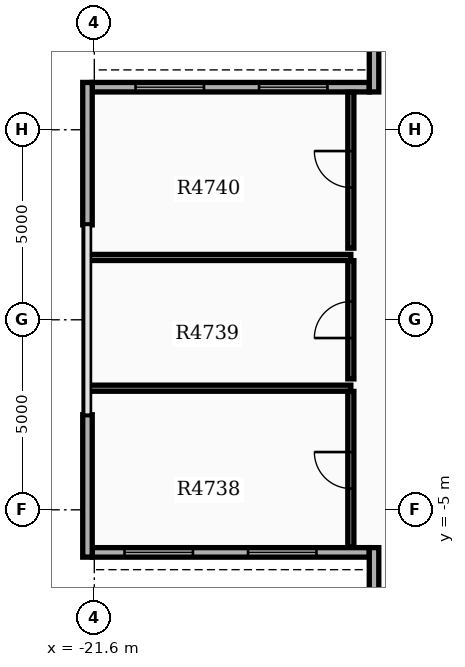
"""IFC4 building model, lengths in metres.
Left out: names, types, materials, properties, quantities, classifications, styles, units other than length and angle.
Written with IfcOpenShell. Run it as: python <this file> out.ifc"""

import sys

from ifc_helpers import new_model, si_unit, direction, frame, frame_2d, origin, place, context, subcontext, project, spatial, rectangle, extrude, element, fill, save


model = new_model("IFC4")
c1 = context("Model", 3, precision=1e-05, world=origin(), true_north=direction((0.0, 1.0)))
c2 = subcontext(c1, "Body", "Model", "MODEL_VIEW")
j1 = project(units=[si_unit("LENGTHUNIT", "METRE"), si_unit("PLANEANGLEUNIT", "RADIAN")], contexts=[c1])
p1 = place(None, origin())
s1 = spatial("IfcSite", under=j1, at=p1, CompositionType="ELEMENT")
p2 = place(p1, origin())
s2 = spatial("IfcBuilding", under=s1, at=p2, CompositionType="ELEMENT")
p3 = place(p2, frame((0.0, 0.0, 308.4)))
s3 = spatial("IfcBuildingStorey", under=s2, at=p3, CompositionType="ELEMENT", Elevation=308.4)
p4 = place(p3, frame((-14.365, 6.12, 0.0), z_axis=(0.0, 0.0, 1.0), x_axis=(-1.0, 0.0, 0.0)))
e1 = element("IfcWall", 1, at=p4, inside=s3, PredefinedType="STANDARD", context=c2, shape_type="SweptSolid", body=[
    extrude(rectangle(XDim=7.29, YDim=0.25, at=frame_2d((3.645, 0.0))), origin(), (0.0, 0.0, 1.0), 3.73),
])
p5 = place(p4, frame((1.1, 0.0, 0.8)))
e2 = element("IfcOpeningElement", 2, at=p5, cuts=e1, PredefinedType="OPENING", context=c2, shape_type="SweptSolid", body=[
    extrude(rectangle(XDim=1.8, YDim=1.8, at=frame_2d((0.9, 0.9))), frame((0.0, 0.135, 0.0), z_axis=(0.0, -1.0, 0.0), x_axis=(1.0, 0.0, 0.0)), (0.0, 0.0, 1.0), 0.27),
])
p6 = place(p4, frame((4.35, 0.0, 0.8)))
e3 = element("IfcOpeningElement", 3, at=p6, cuts=e1, PredefinedType="OPENING", context=c2, shape_type="SweptSolid", body=[
    extrude(rectangle(XDim=1.8, YDim=1.8, at=frame_2d((0.9, 0.9))), frame((0.0, 0.135, 0.0), z_axis=(0.0, -1.0, 0.0), x_axis=(1.0, 0.0, 0.0)), (0.0, 0.0, 1.0), 0.27),
])
p7 = place(p3, frame((-21.655, -6.12, 0.0), z_axis=(0.0, 0.0, 1.0), x_axis=(1.0, 0.0, 0.0)))
e4 = element("IfcWall", 4, at=p7, inside=s3, PredefinedType="STANDARD", context=c2, shape_type="SweptSolid", body=[
    extrude(rectangle(XDim=7.29, YDim=0.25, at=frame_2d((3.645, 0.0))), origin(), (0.0, 0.0, 1.0), 3.73),
])
p8 = place(p7, frame((0.85, 0.0, 0.8)))
e5 = element("IfcOpeningElement", 5, at=p8, cuts=e4, PredefinedType="OPENING", context=c2, shape_type="SweptSolid", body=[
    extrude(rectangle(XDim=1.8, YDim=1.8, at=frame_2d((0.9, 0.9))), frame((0.0, 0.135, 0.0), z_axis=(0.0, -1.0, 0.0), x_axis=(1.0, 0.0, 0.0)), (0.0, 0.0, 1.0), 0.27),
])
p9 = place(p7, frame((4.1, 0.0, 0.8)))
e6 = element("IfcOpeningElement", 6, at=p9, cuts=e4, PredefinedType="OPENING", context=c2, shape_type="SweptSolid", body=[
    extrude(rectangle(XDim=1.8, YDim=1.8, at=frame_2d((0.9, 0.9))), frame((0.0, 0.135, 0.0), z_axis=(0.0, -1.0, 0.0), x_axis=(1.0, 0.0, 0.0)), (0.0, 0.0, 1.0), 0.27),
])
for number, where, z_axis, x_axis in (
    (7, (-21.78, 6.245, 0.0), (0.0, 0.0, 1.0), (0.0, -1.0, 0.0)),
    (8, (-21.78, -2.498, 0.0), (0.0, 0.0, 1.0), (0.0, -1.0, 0.0)),
):
    element("IfcWall", number, at=place(p3, frame(where, z_axis=z_axis, x_axis=x_axis)), inside=s3, PredefinedType="STANDARD", context=c2, shape_type="SweptSolid", body=[
        extrude(rectangle(XDim=3.747, YDim=0.25, at=frame_2d((1.874, 0.0))), origin(), (0.0, 0.0, 1.0), 3.73),
    ])
for number, where, z_axis, x_axis in (
    (9, (-14.24, 5.995, 0.0), (0.0, 0.0, 1.0), (0.0, 1.0, 0.0)),
    (10, (-14.24, -5.995, 0.0), (0.0, 0.0, 1.0), (0.0, -1.0, 0.0)),
):
    element("IfcWall", number, at=place(p3, frame(where, z_axis=z_axis, x_axis=x_axis)), inside=s3, PredefinedType="STANDARD", context=c2, shape_type="SweptSolid", body=[
        extrude(rectangle(XDim=6.87, YDim=0.25, at=frame_2d((3.435, 0.0))), origin(), (0.0, 0.0, 1.0), 3.73),
    ])
p10 = place(p3, frame((-21.78, -1.8, 0.0), z_axis=(0.0, 0.0, 1.0), x_axis=(1.0, 0.0, 0.0)))
e11 = element("IfcWall", 11, at=p10, inside=s3, PredefinedType="PARTITIONING", context=c2, shape_type="SweptSolid", body=[
    extrude(rectangle(XDim=6.93, YDim=0.16, at=frame_2d((3.465, 0.0))), origin(), (0.0, 0.0, 1.0), 3.72),
])
p11 = place(p3, frame((-14.85, -5.987, 0.0), z_axis=(0.0, 0.0, 1.0), x_axis=(0.0, 1.0, 0.0)))
e12 = element("IfcWall", 12, at=p11, inside=s3, PredefinedType="PARTITIONING", context=c2, shape_type="SweptSolid", body=[
    extrude(rectangle(XDim=4.102, YDim=0.16, at=frame_2d((2.051, 0.0))), origin(), (0.0, 0.0, 1.0), 3.72),
])
p12 = place(p11, frame((1.547, 0.0, 0.0)))
e13 = element("IfcOpeningElement", 13, at=p12, cuts=e12, PredefinedType="OPENING", context=c2, shape_type="SweptSolid", body=[
    extrude(rectangle(XDim=0.96, YDim=2.15, at=frame_2d((0.48, 1.075))), frame((0.0, 0.09, 0.0), z_axis=(0.0, -1.0, 0.0), x_axis=(1.0, 0.0, 0.0)), (0.0, 0.0, 1.0), 0.18),
])
p13 = place(p3, frame((-21.78, 1.64, 0.0), z_axis=(0.0, 0.0, 1.0), x_axis=(1.0, 0.0, 0.0)))
e14 = element("IfcWall", 14, at=p13, inside=s3, PredefinedType="PARTITIONING", context=c2, shape_type="SweptSolid", body=[
    extrude(rectangle(XDim=6.93, YDim=0.16, at=frame_2d((3.465, 0.0))), origin(), (0.0, 0.0, 1.0), 3.72),
])
p14 = place(p3, frame((-14.85, -1.555, 0.0), z_axis=(0.0, 0.0, 1.0), x_axis=(0.0, 1.0, 0.0)))
e15 = element("IfcWall", 15, at=p14, inside=s3, PredefinedType="PARTITIONING", context=c2, shape_type="SweptSolid", body=[
    extrude(rectangle(XDim=3.11, YDim=0.16, at=frame_2d((1.555, 0.0))), origin(), (0.0, 0.0, 1.0), 3.72),
])
p15 = place(p14, frame((1.075, 0.0, 0.0)))
e16 = element("IfcOpeningElement", 16, at=p15, cuts=e15, PredefinedType="OPENING", context=c2, shape_type="SweptSolid", body=[
    extrude(rectangle(XDim=0.96, YDim=2.15, at=frame_2d((0.48, 1.075))), frame((0.0, 0.09, 0.0), z_axis=(0.0, -1.0, 0.0), x_axis=(1.0, 0.0, 0.0)), (0.0, 0.0, 1.0), 0.18),
])
p16 = place(p3, frame((-14.85, 1.885, 0.0), z_axis=(0.0, 0.0, 1.0), x_axis=(0.0, 1.0, 0.0)))
e17 = element("IfcWall", 17, at=p16, inside=s3, PredefinedType="PARTITIONING", context=c2, shape_type="SweptSolid", body=[
    extrude(rectangle(XDim=4.102, YDim=0.16, at=frame_2d((2.051, 0.0))), origin(), (0.0, 0.0, 1.0), 3.72),
])
p17 = place(p16, frame((1.595, 0.0, 0.0)))
e18 = element("IfcOpeningElement", 18, at=p17, cuts=e17, PredefinedType="OPENING", context=c2, shape_type="SweptSolid", body=[
    extrude(rectangle(XDim=0.96, YDim=2.15, at=frame_2d((0.48, 1.075))), frame((0.0, 0.09, 0.0), z_axis=(0.0, -1.0, 0.0), x_axis=(1.0, 0.0, 0.0)), (0.0, 0.0, 1.0), 0.18),
])
p18 = place(p5, origin())
e19 = element("IfcWindow", 19, at=p18, inside=s3, PartitioningType="SINGLE_PANEL", PredefinedType="WINDOW", context=c2, shape_type="SweptSolid", body=[
    extrude(rectangle(XDim=1.8, YDim=1.8, at=frame_2d((0.9, 0.9))), frame((0.0, 0.03, 0.0), z_axis=(0.0, -1.0, 0.0), x_axis=(1.0, 0.0, 0.0)), (0.0, 0.0, 1.0), 0.06),
])
fill(e2, e19)
p19 = place(p6, origin())
e20 = element("IfcWindow", 20, at=p19, inside=s3, PartitioningType="SINGLE_PANEL", PredefinedType="WINDOW", context=c2, shape_type="SweptSolid", body=[
    extrude(rectangle(XDim=1.8, YDim=1.8, at=frame_2d((0.9, 0.9))), frame((0.0, 0.03, 0.0), z_axis=(0.0, -1.0, 0.0), x_axis=(1.0, 0.0, 0.0)), (0.0, 0.0, 1.0), 0.06),
])
fill(e3, e20)
p20 = place(p8, origin())
e21 = element("IfcWindow", 21, at=p20, inside=s3, PartitioningType="SINGLE_PANEL", PredefinedType="WINDOW", context=c2, shape_type="SweptSolid", body=[
    extrude(rectangle(XDim=1.8, YDim=1.8, at=frame_2d((0.9, 0.9))), frame((0.0, 0.03, 0.0), z_axis=(0.0, -1.0, 0.0), x_axis=(1.0, 0.0, 0.0)), (0.0, 0.0, 1.0), 0.06),
])
fill(e5, e21)
p21 = place(p9, origin())
e22 = element("IfcWindow", 22, at=p21, inside=s3, PartitioningType="SINGLE_PANEL", PredefinedType="WINDOW", context=c2, shape_type="SweptSolid", body=[
    extrude(rectangle(XDim=1.8, YDim=1.8, at=frame_2d((0.9, 0.9))), frame((0.0, 0.03, 0.0), z_axis=(0.0, -1.0, 0.0), x_axis=(1.0, 0.0, 0.0)), (0.0, 0.0, 1.0), 0.06),
])
fill(e6, e22)
p22 = place(p12, origin())
e23 = element("IfcDoor", 23, at=p22, inside=s3, OperationType="SINGLE_SWING_RIGHT", PredefinedType="DOOR", context=c2, shape_type="SweptSolid", body=[
    extrude(rectangle(XDim=0.96, YDim=2.15, at=frame_2d((0.48, 1.075))), frame((0.0, 0.025, 0.0), z_axis=(0.0, -1.0, 0.0), x_axis=(1.0, 0.0, 0.0)), (0.0, 0.0, 1.0), 0.05),
])
fill(e13, e23)
p23 = place(p15, origin())
e24 = element("IfcDoor", 24, at=p23, inside=s3, OperationType="SINGLE_SWING_LEFT", PredefinedType="DOOR", context=c2, shape_type="SweptSolid", body=[
    extrude(rectangle(XDim=0.96, YDim=2.15, at=frame_2d((0.48, 1.075))), frame((0.0, 0.025, 0.0), z_axis=(0.0, -1.0, 0.0), x_axis=(1.0, 0.0, 0.0)), (0.0, 0.0, 1.0), 0.05),
])
fill(e16, e24)
p24 = place(p17, origin())
e25 = element("IfcDoor", 25, at=p24, inside=s3, OperationType="SINGLE_SWING_RIGHT", PredefinedType="DOOR", context=c2, shape_type="SweptSolid", body=[
    extrude(rectangle(XDim=0.96, YDim=2.15, at=frame_2d((0.48, 1.075))), frame((0.0, 0.025, 0.0), z_axis=(0.0, -1.0, 0.0), x_axis=(1.0, 0.0, 0.0)), (0.0, 0.0, 1.0), 0.05),
])
fill(e18, e25)
save(model, sys.argv[1])
